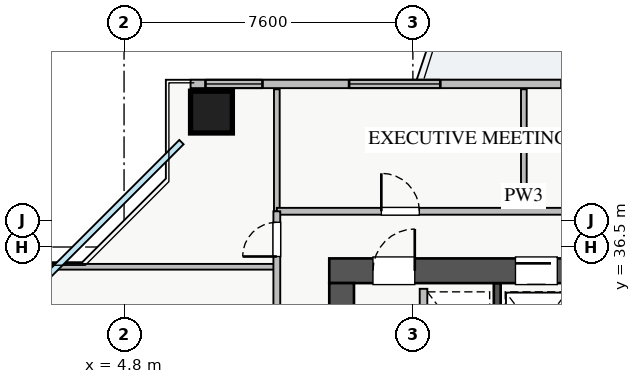
"""IFC4 building model, lengths in metres.
Left out: names, types, materials, properties, quantities, classifications, styles, units other than length and angle.
Written with IfcOpenShell. Run it as: python <this file> out.ifc"""

import sys

from ifc_helpers import new_model, si_unit, direction, frame, frame_2d, origin, origin_2d, place, context, subcontext, project, spatial, rectangle, extrude, source, transform, mapped, element, fill, save


model = new_model("IFC4")
c1 = context("Model", 3, precision=1e-05, world=origin(), true_north=direction((0.0, 1.0)))
c2 = subcontext(c1, "Body", "Model", "MODEL_VIEW")
j1 = project(units=[si_unit("LENGTHUNIT", "METRE"), si_unit("PLANEANGLEUNIT", "RADIAN")], contexts=[c1])
p1 = place(None, origin())
s1 = spatial("IfcSite", under=j1, at=p1, CompositionType="ELEMENT")
p2 = place(p1, origin())
s2 = spatial("IfcBuilding", under=s1, at=p2, CompositionType="ELEMENT")
p3 = place(p2, frame((0.0, 0.0, 97.0)))
s3 = spatial("IfcBuildingStorey", under=s2, at=p3, CompositionType="ELEMENT", Elevation=97.0)
p4 = place(p3, frame((14.62, 33.2, 0.0), z_axis=(0.0, 0.0, 1.0), x_axis=(0.0, 1.0, 0.0)))
e1 = element("IfcWall", 1, at=p4, inside=s3, PredefinedType="SHEAR", context=c2, shape_type="SweptSolid", body=[
    extrude(rectangle(XDim=2.35, YDim=0.18, at=frame_2d((1.175, 0.0))), origin(), (0.0, 0.0, 1.0), 3.07),
])
p5 = place(p3, frame((10.2, 35.875, 0.0), z_axis=(0.0, 0.0, 1.0), x_axis=(1.0, 0.0, 0.0)))
e2 = element("IfcWall", 2, at=p5, inside=s3, PredefinedType="SHEAR", context=c2, shape_type="SweptSolid", body=[
    extrude(rectangle(XDim=17.6, YDim=0.65, at=frame_2d((8.8, 0.0))), origin(), (0.0, 0.0, 1.0), 3.25),
])
p6 = place(p5, frame((1.15, 0.0, 0.0)))
e3 = element("IfcOpeningElement", 3, at=p6, cuts=e2, PredefinedType="OPENING", context=c2, shape_type="SweptSolid", body=[
    extrude(rectangle(XDim=1.1, YDim=2.05, at=frame_2d((0.55, 1.025))), frame((0.0, 0.335, 0.0), z_axis=(0.0, -1.0, 0.0), x_axis=(1.0, 0.0, 0.0)), (0.0, 0.0, 1.0), 0.67),
])
p7 = place(p5, frame((8.3, 0.0, 0.0)))
e4 = element("IfcOpeningElement", 4, at=p7, cuts=e2, PredefinedType="OPENING", context=c2, shape_type="SweptSolid", body=[
    extrude(rectangle(XDim=1.1, YDim=2.05, at=frame_2d((0.55, 1.025))), frame((0.0, 0.335, 0.0), z_axis=(0.0, -1.0, 0.0), x_axis=(1.0, 0.0, 0.0)), (0.0, 0.0, 1.0), 0.67),
])
p8 = place(p5, frame((4.9, 0.0, 0.0)))
e5 = element("IfcOpeningElement", 5, at=p8, cuts=e2, PredefinedType="OPENING", context=c2, shape_type="SweptSolid", body=[
    extrude(rectangle(XDim=1.1, YDim=2.05, at=frame_2d((0.55, 1.025))), frame((0.0, 0.335, 0.0), z_axis=(0.0, -1.0, 0.0), x_axis=(1.0, 0.0, 0.0)), (0.0, 0.0, 1.0), 0.67),
])
p9 = place(p5, frame((14.74, 0.0, 0.0)))
e6 = element("IfcOpeningElement", 6, at=p9, cuts=e2, PredefinedType="OPENING", context=c2, shape_type="SweptSolid", body=[
    extrude(rectangle(XDim=1.0, YDim=2.05, at=frame_2d((0.5, 1.025))), frame((0.0, 0.335, 0.0), z_axis=(0.0, -1.0, 0.0), x_axis=(1.0, 0.0, 0.0)), (0.0, 0.0, 1.0), 0.67),
])
p10 = place(p5, frame((10.175, 0.0, 0.0)))
e7 = element("IfcOpeningElement", 7, at=p10, cuts=e2, PredefinedType="OPENING", context=c2, shape_type="SweptSolid", body=[
    extrude(rectangle(XDim=1.0, YDim=2.05, at=frame_2d((0.5, 1.025))), frame((0.0, 0.335, 0.0), z_axis=(0.0, -1.0, 0.0), x_axis=(1.0, 0.0, 0.0)), (0.0, 0.0, 1.0), 0.67),
])
p11 = place(p5, frame((12.625, 0.0, 0.0)))
e8 = element("IfcOpeningElement", 8, at=p11, cuts=e2, PredefinedType="OPENING", context=c2, shape_type="SweptSolid", body=[
    extrude(rectangle(XDim=1.0, YDim=2.05, at=frame_2d((0.5, 1.025))), frame((0.0, 0.335, 0.0), z_axis=(0.0, -1.0, 0.0), x_axis=(1.0, 0.0, 0.0)), (0.0, 0.0, 1.0), 0.67),
])
p12 = place(p3, frame((10.525, 29.65, 0.0), z_axis=(0.0, 0.0, 1.0), x_axis=(0.0, 1.0, 0.0)))
e9 = element("IfcWall", 9, at=p12, inside=s3, PredefinedType="SHEAR", context=c2, shape_type="SweptSolid", body=[
    extrude(rectangle(XDim=5.9, YDim=0.65, at=frame_2d((2.95, 0.0))), origin(), (0.0, 0.0, 1.0), 3.25),
])
m1 = source(origin(), c2, "Body", "SweptSolid", [
    extrude(rectangle(XDim=1.1, YDim=1.1, at=origin_2d()), origin(), (0.0, 0.0, 1.0), 3.25),
])
p13 = place(p3, frame((7.1, 40.05, 0.0), z_axis=(0.0, 0.0, 1.0), x_axis=(1.0, 0.0, 0.0)))
e10 = element("IfcColumn", 10, at=p13, inside=s3, PredefinedType="COLUMN", context=c2, shape_type="MappedRepresentation", body=[
    mapped(m1, transform((0.0, 0.0, 0.0), x_axis=(1.0, 0.0, 0.0), y_axis=(0.0, 1.0, 0.0), z_axis=(0.0, 0.0, 1.0), scale=1.0)),
])
p14 = place(p3, frame((6.55, 40.79, 0.0), z_axis=(0.0, 0.0, 1.0), x_axis=(1.0, 0.0, 0.0)))
e11 = element("IfcWall", 11, at=p14, inside=s3, PredefinedType="STANDARD", context=c2, shape_type="SweptSolid", body=[
    extrude(rectangle(XDim=24.9, YDim=0.22, at=frame_2d((12.45, 0.0))), origin(), (0.0, 0.0, 1.0), 2.61),
])
p15 = place(p14, frame((13.3, 0.0, 0.0)))
e12 = element("IfcOpeningElement", 12, at=p15, cuts=e11, PredefinedType="OPENING", context=c2, shape_type="SweptSolid", body=[
    extrude(rectangle(XDim=1.2, YDim=2.1, at=frame_2d((0.6, 1.05))), frame((0.0, 0.12, 0.0), z_axis=(0.0, -1.0, 0.0), x_axis=(1.0, 0.0, 0.0)), (0.0, 0.0, 1.0), 0.24),
])
p16 = place(p14, frame((0.393, 0.0, 0.9)))
e13 = element("IfcOpeningElement", 13, at=p16, cuts=e11, PredefinedType="OPENING", context=c2, shape_type="SweptSolid", body=[
    extrude(rectangle(XDim=1.5, YDim=1.5, at=frame_2d((0.75, 0.75))), frame((0.0, 0.12, 0.0), z_axis=(0.0, -1.0, 0.0), x_axis=(1.0, 0.0, 0.0)), (0.0, 0.0, 1.0), 0.24),
])
p17 = place(p14, frame((9.76, 0.0, 0.9)))
e14 = element("IfcOpeningElement", 14, at=p17, cuts=e11, PredefinedType="OPENING", context=c2, shape_type="SweptSolid", body=[
    extrude(rectangle(XDim=1.8, YDim=1.5, at=frame_2d((0.9, 0.75))), frame((0.0, 0.12, 0.0), z_axis=(0.0, -1.0, 0.0), x_axis=(1.0, 0.0, 0.0)), (0.0, 0.0, 1.0), 0.24),
])
p18 = place(p14, frame((14.813, 0.0, 0.9)))
e15 = element("IfcOpeningElement", 15, at=p18, cuts=e11, PredefinedType="OPENING", context=c2, shape_type="SweptSolid", body=[
    extrude(rectangle(XDim=1.5, YDim=1.45, at=frame_2d((0.75, 0.725))), frame((0.0, 0.12, 0.0), z_axis=(0.0, -1.0, 0.0), x_axis=(1.0, 0.0, 0.0)), (0.0, 0.0, 1.0), 0.24),
])
p19 = place(p14, frame((20.738, 0.0, 0.9)))
e16 = element("IfcOpeningElement", 16, at=p19, cuts=e11, PredefinedType="OPENING", context=c2, shape_type="SweptSolid", body=[
    extrude(rectangle(XDim=2.1, YDim=1.48, at=frame_2d((1.05, 0.74))), frame((0.0, 0.12, 0.0), z_axis=(0.0, -1.0, 0.0), x_axis=(1.0, 0.0, 0.0)), (0.0, 0.0, 1.0), 0.24),
])
p20 = place(p14, frame((4.171, 0.0, 0.9)))
e17 = element("IfcOpeningElement", 17, at=p20, cuts=e11, PredefinedType="OPENING", context=c2, shape_type="SweptSolid", body=[
    extrude(rectangle(XDim=2.4, YDim=1.5, at=frame_2d((1.2, 0.75))), frame((0.0, 0.12, 0.0), z_axis=(0.0, -1.0, 0.0), x_axis=(1.0, 0.0, 0.0)), (0.0, 0.0, 1.0), 0.24),
])
p21 = place(p3, frame((12.68, 33.19, 0.0), z_axis=(0.0, 0.0, 1.0), x_axis=(0.0, 1.0, 0.0)))
e18 = element("IfcWall", 18, at=p21, inside=s3, PredefinedType="PARTITIONING", context=c2, shape_type="SweptSolid", body=[
    extrude(rectangle(XDim=2.21, YDim=0.2, at=frame_2d((1.105, 0.0))), origin(), (0.0, 0.0, 1.0), 3.07),
])
for number, where, z_axis, x_axis in (
    (19, (15.32, 37.44, 0.0), (0.0, 0.0, 1.0), (0.0, 1.0, 0.0)),
    (20, (8.82, 37.44, 0.0), (0.0, 0.0, 1.0), (0.0, 1.0, 0.0)),
):
    element("IfcWall", number, at=place(p3, frame(where, z_axis=z_axis, x_axis=x_axis)), inside=s3, PredefinedType="PARTITIONING", context=c2, shape_type="SweptSolid", body=[
        extrude(rectangle(XDim=3.21, YDim=0.15, at=frame_2d((1.605, 0.0))), origin(), (0.0, 0.0, 1.0), 3.07),
    ])
p22 = place(p3, frame((8.82, 37.44, 0.0), z_axis=(0.0, 0.0, 1.0), x_axis=(1.0, 0.0, 0.0)))
e21 = element("IfcWall", 21, at=p22, inside=s3, PredefinedType="PARTITIONING", context=c2, shape_type="SweptSolid", body=[
    extrude(rectangle(XDim=23.58, YDim=0.18, at=frame_2d((11.79, 0.0))), origin(), (0.0, 0.0, 1.0), 3.07),
])
p23 = place(p22, frame((2.75, 0.0, 0.0)))
e22 = element("IfcOpeningElement", 22, at=p23, cuts=e21, PredefinedType="OPENING", context=c2, shape_type="SweptSolid", body=[
    extrude(rectangle(XDim=1.0, YDim=2.05, at=frame_2d((0.5, 1.025))), frame((0.0, 0.1, 0.0), z_axis=(0.0, -1.0, 0.0), x_axis=(1.0, 0.0, 0.0)), (0.0, 0.0, 1.0), 0.2),
])
p24 = place(p22, frame((7.89, 0.0, 0.0)))
e23 = element("IfcOpeningElement", 23, at=p24, cuts=e21, PredefinedType="OPENING", context=c2, shape_type="SweptSolid", body=[
    extrude(rectangle(XDim=1.0, YDim=2.05, at=frame_2d((0.5, 1.025))), frame((0.0, 0.1, 0.0), z_axis=(0.0, -1.0, 0.0), x_axis=(1.0, 0.0, 0.0)), (0.0, 0.0, 1.0), 0.2),
])
p25 = place(p22, frame((13.325, 0.0, 0.0)))
e24 = element("IfcOpeningElement", 24, at=p25, cuts=e21, PredefinedType="OPENING", context=c2, shape_type="SweptSolid", body=[
    extrude(rectangle(XDim=1.0, YDim=2.05, at=frame_2d((0.5, 1.025))), frame((0.0, 0.1, 0.0), z_axis=(0.0, -1.0, 0.0), x_axis=(1.0, 0.0, 0.0)), (0.0, 0.0, 1.0), 0.2),
])
p26 = place(p22, frame((19.765, 0.0, 0.0)))
e25 = element("IfcOpeningElement", 25, at=p26, cuts=e21, PredefinedType="OPENING", context=c2, shape_type="SweptSolid", body=[
    extrude(rectangle(XDim=1.0, YDim=2.05, at=frame_2d((0.5, 1.025))), frame((0.0, 0.1, 0.0), z_axis=(0.0, -1.0, 0.0), x_axis=(1.0, 0.0, 0.0)), (0.0, 0.0, 1.0), 0.2),
])
p27 = place(p3, frame((1.35, 35.98, 0.0), z_axis=(0.0, 0.0, 1.0), x_axis=(1.0, 0.0, 0.0)))
e26 = element("IfcWall", 26, at=p27, inside=s3, PredefinedType="PARTITIONING", context=c2, shape_type="SweptSolid", body=[
    extrude(rectangle(XDim=7.47, YDim=0.15, at=frame_2d((3.735, 0.0))), origin(), (0.0, 0.0, 1.0), 3.07),
])
p28 = place(p3, frame((8.82, 8.31, 0.0), z_axis=(0.0, 0.0, 1.0), x_axis=(0.0, 1.0, 0.0)))
e27 = element("IfcWall", 27, at=p28, inside=s3, PredefinedType="PARTITIONING", context=c2, shape_type="SweptSolid", body=[
    extrude(rectangle(XDim=29.13, YDim=0.18, at=frame_2d((14.565, 0.0))), origin(), (0.0, 0.0, 1.0), 3.07),
])
p29 = place(p28, frame((27.94, 0.0, 0.0)))
e28 = element("IfcOpeningElement", 28, at=p29, cuts=e27, PredefinedType="OPENING", context=c2, shape_type="SweptSolid", body=[
    extrude(rectangle(XDim=0.9, YDim=2.05, at=frame_2d((0.45, 1.025))), frame((0.0, 0.1, 0.0), z_axis=(0.0, -1.0, 0.0), x_axis=(1.0, 0.0, 0.0)), (0.0, 0.0, 1.0), 0.2),
])
p30 = place(p28, frame((0.24, 0.0, 0.0)))
e29 = element("IfcOpeningElement", 29, at=p30, cuts=e27, PredefinedType="OPENING", context=c2, shape_type="SweptSolid", body=[
    extrude(rectangle(XDim=0.9, YDim=2.05, at=frame_2d((0.45, 1.025))), frame((0.0, 0.1, 0.0), z_axis=(0.0, -1.0, 0.0), x_axis=(1.0, 0.0, 0.0)), (0.0, 0.0, 1.0), 0.2),
])
p31 = place(p28, frame((3.69, 0.0, 0.0)))
e30 = element("IfcOpeningElement", 30, at=p31, cuts=e27, PredefinedType="OPENING", context=c2, shape_type="SweptSolid", body=[
    extrude(rectangle(XDim=1.0, YDim=2.05, at=frame_2d((0.5, 1.025))), frame((0.0, 0.1, 0.0), z_axis=(0.0, -1.0, 0.0), x_axis=(1.0, 0.0, 0.0)), (0.0, 0.0, 1.0), 0.2),
])
p32 = place(p28, frame((20.305, 0.0, 0.0)))
e31 = element("IfcOpeningElement", 31, at=p32, cuts=e27, PredefinedType="OPENING", context=c2, shape_type="SweptSolid", body=[
    extrude(rectangle(XDim=1.0, YDim=2.05, at=frame_2d((0.5, 1.025))), frame((0.0, 0.1, 0.0), z_axis=(0.0, -1.0, 0.0), x_axis=(1.0, 0.0, 0.0)), (0.0, 0.0, 1.0), 0.2),
])
m2 = source(origin(), c2, "Body", "SweptSolid", [
    extrude(rectangle(XDim=1.5, YDim=1.5, at=frame_2d((0.75, 0.75))), frame((0.0, 0.03, 0.0), z_axis=(0.0, -1.0, 0.0), x_axis=(1.0, 0.0, 0.0)), (0.0, 0.0, 1.0), 0.06),
])
p33 = place(p16, origin())
e32 = element("IfcWindow", 32, at=p33, inside=s3, PartitioningType="TRIPLE_PANEL_VERTICAL", PredefinedType="WINDOW", context=c2, shape_type="MappedRepresentation", body=[
    mapped(m2, transform((0.0, 0.0, 0.0), x_axis=(1.0, 0.0, 0.0), y_axis=(0.0, 1.0, 0.0), z_axis=(0.0, 0.0, 1.0), scale=1.0)),
])
fill(e13, e32)
m3 = source(origin(), c2, "Body", "SweptSolid", [
    extrude(rectangle(XDim=1.1, YDim=2.05, at=frame_2d((0.55, 1.025))), frame((0.0, 0.025, 0.0), z_axis=(0.0, -1.0, 0.0), x_axis=(1.0, 0.0, 0.0)), (0.0, 0.0, 1.0), 0.05),
])
p34 = place(p6, origin())
e33 = element("IfcDoor", 33, at=p34, inside=s3, OperationType="SINGLE_SWING_RIGHT", PredefinedType="DOOR", context=c2, shape_type="MappedRepresentation", body=[
    mapped(m3, transform((0.0, 0.0, 0.0), x_axis=(1.0, 0.0, 0.0), y_axis=(0.0, 1.0, 0.0), z_axis=(0.0, 0.0, 1.0), scale=1.0)),
])
fill(e3, e33)
p35 = place(p8, origin())
e34 = element("IfcDoor", 34, at=p35, inside=s3, OperationType="SLIDING_TO_LEFT", PredefinedType="DOOR", context=c2, shape_type="MappedRepresentation", body=[
    mapped(m3, transform((0.0, 0.0, 0.0), x_axis=(1.0, 0.0, 0.0), y_axis=(0.0, 1.0, 0.0), z_axis=(0.0, 0.0, 1.0), scale=1.0)),
])
fill(e5, e34)
m4 = source(origin(), c2, "Body", "SweptSolid", [
    extrude(rectangle(XDim=1.0, YDim=2.05, at=frame_2d((0.5, 1.025))), frame((0.0, 0.025, 0.0), z_axis=(0.0, -1.0, 0.0), x_axis=(1.0, 0.0, 0.0)), (0.0, 0.0, 1.0), 0.05),
])
p36 = place(p23, origin())
e35 = element("IfcDoor", 35, at=p36, inside=s3, OperationType="SINGLE_SWING_LEFT", PredefinedType="DOOR", context=c2, shape_type="MappedRepresentation", body=[
    mapped(m4, transform((0.0, 0.0, 0.0), x_axis=(1.0, 0.0, 0.0), y_axis=(0.0, 1.0, 0.0), z_axis=(0.0, 0.0, 1.0), scale=1.0)),
])
fill(e22, e35)
m5 = source(origin(), c2, "Body", "SweptSolid", [
    extrude(rectangle(XDim=0.9, YDim=2.05, at=frame_2d((0.45, 1.025))), frame((0.0, 0.025, 0.0), z_axis=(0.0, -1.0, 0.0), x_axis=(1.0, 0.0, 0.0)), (0.0, 0.0, 1.0), 0.05),
])
p37 = place(p29, origin())
e36 = element("IfcDoor", 36, at=p37, inside=s3, OperationType="SINGLE_SWING_LEFT", PredefinedType="DOOR", context=c2, shape_type="MappedRepresentation", body=[
    mapped(m5, transform((0.0, 0.0, 0.0), x_axis=(1.0, 0.0, 0.0), y_axis=(0.0, 1.0, 0.0), z_axis=(0.0, 0.0, 1.0), scale=1.0)),
])
fill(e28, e36)
m6 = source(origin(), c2, "Body", "SweptSolid", [
    extrude(rectangle(XDim=2.4, YDim=1.5, at=frame_2d((1.2, 0.75))), frame((0.0, 0.03, 0.0), z_axis=(0.0, -1.0, 0.0), x_axis=(1.0, 0.0, 0.0)), (0.0, 0.0, 1.0), 0.06),
])
p38 = place(p20, origin())
e37 = element("IfcWindow", 37, at=p38, inside=s3, PartitioningType="TRIPLE_PANEL_VERTICAL", PredefinedType="WINDOW", context=c2, shape_type="MappedRepresentation", body=[
    mapped(m6, transform((0.0, 0.0, 0.0), x_axis=(1.0, 0.0, 0.0), y_axis=(0.0, 1.0, 0.0), z_axis=(0.0, 0.0, 1.0), scale=1.0)),
])
fill(e17, e37)
save(model, sys.argv[1])
